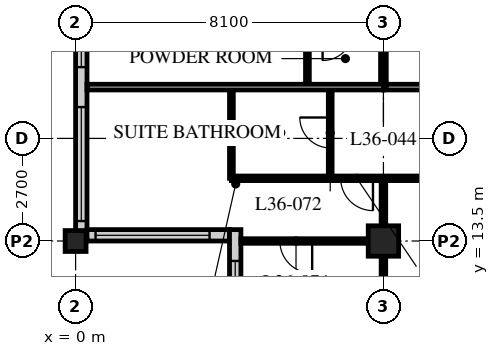
"""IFC4 building model, lengths in metres.
Left out: names, types, materials, properties, quantities, classifications, styles, units other than length and angle.
Written with IfcOpenShell. Run it as: python <this file> out.ifc"""

import sys

from ifc_helpers import new_model, si_unit, direction, frame, frame_2d, origin, origin_2d, place, context, subcontext, project, spatial, rectangle, hollow_rectangle, extrude, element, fill, save


model = new_model("IFC4")
c1 = context("Model", 3, precision=1e-05, world=origin(), true_north=direction((0.0, 1.0)))
c2 = subcontext(c1, "Body", "Model", "MODEL_VIEW")
j1 = project(units=[si_unit("LENGTHUNIT", "METRE"), si_unit("PLANEANGLEUNIT", "RADIAN")], contexts=[c1])
p1 = place(None, origin())
s1 = spatial("IfcSite", under=j1, at=p1, CompositionType="ELEMENT")
p2 = place(p1, origin())
s2 = spatial("IfcBuilding", under=s1, at=p2, CompositionType="ELEMENT")
p3 = place(p2, frame((0.0, 0.0, 140.8)))
s3 = spatial("IfcBuildingStorey", under=s2, at=p3, CompositionType="ELEMENT", Elevation=140.8)
p4 = place(p3, frame((0.0, 13.5, 0.0), z_axis=(0.0, 0.0, 1.0), x_axis=(1.0, 0.0, 0.0)))
e1 = element("IfcColumn", 1, at=p4, inside=s3, PredefinedType="COLUMN", context=c2, shape_type="SweptSolid", body=[
    extrude(hollow_rectangle(XDim=0.55, YDim=0.55, WallThickness=0.04, at=origin_2d()), origin(), (0.0, 0.0, 1.0), 3.4),
])
p5 = place(p3, frame((8.1, 13.5, 0.0), z_axis=(0.0, 0.0, 1.0), x_axis=(1.0, 0.0, 0.0)))
e2 = element("IfcColumn", 2, at=p5, inside=s3, PredefinedType="COLUMN", context=c2, shape_type="SweptSolid", body=[
    extrude(hollow_rectangle(XDim=0.8, YDim=0.8, WallThickness=0.08, at=origin_2d()), origin(), (0.0, 0.0, 1.0), 3.4),
])
p6 = place(p3, frame((0.15, 45.6, 0.0), z_axis=(0.0, 0.0, 1.0), x_axis=(0.0, -1.0, 0.0)))
e3 = element("IfcWall", 3, at=p6, inside=s3, PredefinedType="SOLIDWALL", context=c2, shape_type="SweptSolid", body=[
    extrude(rectangle(XDim=32.1, YDim=0.3, at=frame_2d((16.05, 0.0))), origin(), (0.0, 0.0, 1.0), 3.19),
])
p7 = place(p6, frame((0.225, 0.0, 0.9)))
e4 = element("IfcOpeningElement", 4, at=p7, cuts=e3, PredefinedType="OPENING", context=c2, shape_type="SweptSolid", body=[
    extrude(rectangle(XDim=3.0, YDim=2.0, at=frame_2d((1.5, 1.0))), frame((0.0, 0.16, 0.0), z_axis=(0.0, -1.0, 0.0), x_axis=(1.0, 0.0, 0.0)), (0.0, 0.0, 1.0), 0.32),
])
p8 = place(p6, frame((4.275, 0.0, 0.9)))
e5 = element("IfcOpeningElement", 5, at=p8, cuts=e3, PredefinedType="OPENING", context=c2, shape_type="SweptSolid", body=[
    extrude(rectangle(XDim=3.0, YDim=2.0, at=frame_2d((1.5, 1.0))), frame((0.0, 0.16, 0.0), z_axis=(0.0, -1.0, 0.0), x_axis=(1.0, 0.0, 0.0)), (0.0, 0.0, 1.0), 0.32),
])
p9 = place(p6, frame((8.325, 0.0, 0.9)))
e6 = element("IfcOpeningElement", 6, at=p9, cuts=e3, PredefinedType="OPENING", context=c2, shape_type="SweptSolid", body=[
    extrude(rectangle(XDim=3.0, YDim=2.0, at=frame_2d((1.5, 1.0))), frame((0.0, 0.16, 0.0), z_axis=(0.0, -1.0, 0.0), x_axis=(1.0, 0.0, 0.0)), (0.0, 0.0, 1.0), 0.32),
])
p10 = place(p6, frame((12.375, 0.0, 0.9)))
e7 = element("IfcOpeningElement", 7, at=p10, cuts=e3, PredefinedType="OPENING", context=c2, shape_type="SweptSolid", body=[
    extrude(rectangle(XDim=3.0, YDim=2.0, at=frame_2d((1.5, 1.0))), frame((0.0, 0.16, 0.0), z_axis=(0.0, -1.0, 0.0), x_axis=(1.0, 0.0, 0.0)), (0.0, 0.0, 1.0), 0.32),
])
p11 = place(p6, frame((16.425, 0.0, 0.9)))
e8 = element("IfcOpeningElement", 8, at=p11, cuts=e3, PredefinedType="OPENING", context=c2, shape_type="SweptSolid", body=[
    extrude(rectangle(XDim=3.0, YDim=2.0, at=frame_2d((1.5, 1.0))), frame((0.0, 0.16, 0.0), z_axis=(0.0, -1.0, 0.0), x_axis=(1.0, 0.0, 0.0)), (0.0, 0.0, 1.0), 0.32),
])
p12 = place(p6, frame((20.475, 0.0, 0.9)))
e9 = element("IfcOpeningElement", 9, at=p12, cuts=e3, PredefinedType="OPENING", context=c2, shape_type="SweptSolid", body=[
    extrude(rectangle(XDim=3.0, YDim=2.0, at=frame_2d((1.5, 1.0))), frame((0.0, 0.16, 0.0), z_axis=(0.0, -1.0, 0.0), x_axis=(1.0, 0.0, 0.0)), (0.0, 0.0, 1.0), 0.32),
])
p13 = place(p6, frame((24.525, 0.0, 0.9)))
e10 = element("IfcOpeningElement", 10, at=p13, cuts=e3, PredefinedType="OPENING", context=c2, shape_type="SweptSolid", body=[
    extrude(rectangle(XDim=3.0, YDim=2.0, at=frame_2d((1.5, 1.0))), frame((0.0, 0.16, 0.0), z_axis=(0.0, -1.0, 0.0), x_axis=(1.0, 0.0, 0.0)), (0.0, 0.0, 1.0), 0.32),
])
p14 = place(p6, frame((28.575, 0.0, 0.9)))
e11 = element("IfcOpeningElement", 11, at=p14, cuts=e3, PredefinedType="OPENING", context=c2, shape_type="SweptSolid", body=[
    extrude(rectangle(XDim=3.0, YDim=2.0, at=frame_2d((1.5, 1.0))), frame((0.0, 0.16, 0.0), z_axis=(0.0, -1.0, 0.0), x_axis=(1.0, 0.0, 0.0)), (0.0, 0.0, 1.0), 0.32),
])
p15 = place(p3, frame((0.3, 13.65, 0.0), z_axis=(0.0, 0.0, 1.0), x_axis=(1.0, 0.0, 0.0)))
e12 = element("IfcWall", 12, at=p15, inside=s3, PredefinedType="SOLIDWALL", context=c2, shape_type="SweptSolid", body=[
    extrude(rectangle(XDim=3.75, YDim=0.3, at=frame_2d((1.875, 0.0))), origin(), (0.0, 0.0, 1.0), 3.19),
])
p16 = place(p15, frame((0.225, 0.0, 0.9)))
e13 = element("IfcOpeningElement", 13, at=p16, cuts=e12, PredefinedType="OPENING", context=c2, shape_type="SweptSolid", body=[
    extrude(rectangle(XDim=3.0, YDim=1.5, at=frame_2d((1.5, 0.75))), frame((0.0, 0.16, 0.0), z_axis=(0.0, -1.0, 0.0), x_axis=(1.0, 0.0, 0.0)), (0.0, 0.0, 1.0), 0.32),
])
p17 = place(p3, frame((4.2, 13.8, 0.0), z_axis=(0.0, 0.0, 1.0), x_axis=(0.0, -1.0, 0.0)))
e14 = element("IfcWall", 14, at=p17, inside=s3, PredefinedType="SOLIDWALL", context=c2, shape_type="SweptSolid", body=[
    extrude(rectangle(XDim=4.35, YDim=0.3, at=frame_2d((2.175, 0.0))), origin(), (0.0, 0.0, 1.0), 3.19),
])
p18 = place(p17, frame((0.825, 0.0, 0.9)))
e15 = element("IfcOpeningElement", 15, at=p18, cuts=e14, PredefinedType="OPENING", context=c2, shape_type="SweptSolid", body=[
    extrude(rectangle(XDim=3.0, YDim=1.5, at=frame_2d((1.5, 0.75))), frame((0.0, 0.16, 0.0), z_axis=(0.0, -1.0, 0.0), x_axis=(1.0, 0.0, 0.0)), (0.0, 0.0, 1.0), 0.32),
])
p19 = place(p3, frame((8.1, 17.55, 0.0), z_axis=(0.0, 0.0, 1.0), x_axis=(1.0, 0.0, 0.0)))
e16 = element("IfcWall", 16, at=p19, inside=s3, PredefinedType="PARTITIONING", context=c2, shape_type="SweptSolid", body=[
    extrude(rectangle(XDim=36.45, YDim=0.15, at=frame_2d((18.225, 0.0))), origin(), (0.0, 0.0, 1.0), 3.19),
])
p20 = place(p19, frame((9.625, 0.0, 0.0)))
e17 = element("IfcOpeningElement", 17, at=p20, cuts=e16, PredefinedType="OPENING", context=c2, shape_type="SweptSolid", body=[
    extrude(rectangle(XDim=1.0, YDim=2.1, at=frame_2d((0.5, 1.05))), frame((0.0, 0.085, 0.0), z_axis=(0.0, -1.0, 0.0), x_axis=(1.0, 0.0, 0.0)), (0.0, 0.0, 1.0), 0.17),
])
p21 = place(p19, frame((18.1, 0.0, 0.0)))
e18 = element("IfcOpeningElement", 18, at=p21, cuts=e16, PredefinedType="OPENING", context=c2, shape_type="SweptSolid", body=[
    extrude(rectangle(XDim=1.0, YDim=2.1, at=frame_2d((0.5, 1.05))), frame((0.0, 0.085, 0.0), z_axis=(0.0, -1.0, 0.0), x_axis=(1.0, 0.0, 0.0)), (0.0, 0.0, 1.0), 0.17),
])
p22 = place(p19, frame((26.75, 0.0, 0.0)))
e19 = element("IfcOpeningElement", 19, at=p22, cuts=e16, PredefinedType="OPENING", context=c2, shape_type="SweptSolid", body=[
    extrude(rectangle(XDim=1.0, YDim=2.1, at=frame_2d((0.5, 1.05))), frame((0.0, 0.085, 0.0), z_axis=(0.0, -1.0, 0.0), x_axis=(1.0, 0.0, 0.0)), (0.0, 0.0, 1.0), 0.17),
])
p23 = place(p19, frame((30.8, 0.0, 0.0)))
e20 = element("IfcOpeningElement", 20, at=p23, cuts=e16, PredefinedType="OPENING", context=c2, shape_type="SweptSolid", body=[
    extrude(rectangle(XDim=1.0, YDim=2.1, at=frame_2d((0.5, 1.05))), frame((0.0, 0.085, 0.0), z_axis=(0.0, -1.0, 0.0), x_axis=(1.0, 0.0, 0.0)), (0.0, 0.0, 1.0), 0.17),
])
p24 = place(p19, frame((1.525, 0.0, 0.0)))
e21 = element("IfcOpeningElement", 21, at=p24, cuts=e16, PredefinedType="OPENING", context=c2, shape_type="SweptSolid", body=[
    extrude(rectangle(XDim=1.0, YDim=2.1, at=frame_2d((0.5, 1.05))), frame((0.0, 0.085, 0.0), z_axis=(0.0, -1.0, 0.0), x_axis=(1.0, 0.0, 0.0)), (0.0, 0.0, 1.0), 0.17),
])
p25 = place(p19, frame((33.925, 0.0, 0.0)))
e22 = element("IfcOpeningElement", 22, at=p25, cuts=e16, PredefinedType="OPENING", context=c2, shape_type="SweptSolid", body=[
    extrude(rectangle(XDim=1.0, YDim=2.1, at=frame_2d((0.5, 1.05))), frame((0.0, 0.085, 0.0), z_axis=(0.0, -1.0, 0.0), x_axis=(1.0, 0.0, 0.0)), (0.0, 0.0, 1.0), 0.17),
])
p26 = place(p3, frame((8.1, 17.55, 0.0), z_axis=(0.0, 0.0, 1.0), x_axis=(0.0, 1.0, 0.0)))
e23 = element("IfcWall", 23, at=p26, inside=s3, PredefinedType="PARTITIONING", context=c2, shape_type="SweptSolid", body=[
    extrude(rectangle(XDim=28.35, YDim=0.15, at=frame_2d((14.175, 0.0))), origin(), (0.0, 0.0, 1.0), 2.578),
])
p27 = place(p26, frame((1.9, 0.0, 0.0)))
e24 = element("IfcOpeningElement", 24, at=p27, cuts=e23, PredefinedType="OPENING", context=c2, shape_type="SweptSolid", body=[
    extrude(rectangle(XDim=1.0, YDim=2.1, at=frame_2d((0.5, 1.05))), frame((0.0, 0.085, 0.0), z_axis=(0.0, -1.0, 0.0), x_axis=(1.0, 0.0, 0.0)), (0.0, 0.0, 1.0), 0.17),
])
p28 = place(p26, frame((10.0, 0.0, 0.0)))
e25 = element("IfcOpeningElement", 25, at=p28, cuts=e23, PredefinedType="OPENING", context=c2, shape_type="SweptSolid", body=[
    extrude(rectangle(XDim=1.0, YDim=2.1, at=frame_2d((0.5, 1.05))), frame((0.0, 0.085, 0.0), z_axis=(0.0, -1.0, 0.0), x_axis=(1.0, 0.0, 0.0)), (0.0, 0.0, 1.0), 0.17),
])
p29 = place(p26, frame((18.1, 0.0, 0.0)))
e26 = element("IfcOpeningElement", 26, at=p29, cuts=e23, PredefinedType="OPENING", context=c2, shape_type="SweptSolid", body=[
    extrude(rectangle(XDim=1.0, YDim=2.1, at=frame_2d((0.5, 1.05))), frame((0.0, 0.085, 0.0), z_axis=(0.0, -1.0, 0.0), x_axis=(1.0, 0.0, 0.0)), (0.0, 0.0, 1.0), 0.17),
])
p30 = place(p26, frame((24.9, 0.0, 0.0)))
e27 = element("IfcOpeningElement", 27, at=p30, cuts=e23, PredefinedType="OPENING", context=c2, shape_type="SweptSolid", body=[
    extrude(rectangle(XDim=1.0, YDim=2.1, at=frame_2d((0.5, 1.05))), frame((0.0, 0.085, 0.0), z_axis=(0.0, -1.0, 0.0), x_axis=(1.0, 0.0, 0.0)), (0.0, 0.0, 1.0), 0.17),
])
p31 = place(p3, frame((6.1, 17.55, 0.0), z_axis=(0.0, 0.0, 1.0), x_axis=(0.0, 1.0, 0.0)))
e28 = element("IfcWall", 28, at=p31, inside=s3, PredefinedType="PARTITIONING", context=c2, shape_type="SweptSolid", body=[
    extrude(rectangle(XDim=1.5, YDim=0.1, at=frame_2d((0.75, 0.0))), origin(), (0.0, 0.0, 1.0), 3.19),
])
p32 = place(p3, frame((6.7, 17.55, 0.0), z_axis=(0.0, 0.0, 1.0), x_axis=(0.0, -1.0, 0.0)))
e29 = element("IfcWall", 29, at=p32, inside=s3, PredefinedType="PARTITIONING", context=c2, shape_type="SweptSolid", body=[
    extrude(rectangle(XDim=2.4, YDim=0.1, at=frame_2d((1.2, 0.0))), origin(), (0.0, 0.0, 1.0), 3.19),
])
p33 = place(p32, frame((0.8, 0.0, 0.0)))
e30 = element("IfcOpeningElement", 30, at=p33, cuts=e29, PredefinedType="OPENING", context=c2, shape_type="SweptSolid", body=[
    extrude(rectangle(XDim=0.8, YDim=2.1, at=frame_2d((0.4, 1.05))), frame((0.0, 0.06, 0.0), z_axis=(0.0, -1.0, 0.0), x_axis=(1.0, 0.0, 0.0)), (0.0, 0.0, 1.0), 0.12),
])
p34 = place(p3, frame((4.1, 17.55, 0.0), z_axis=(0.0, 0.0, 1.0), x_axis=(0.0, -1.0, 0.0)))
e31 = element("IfcWall", 31, at=p34, inside=s3, PredefinedType="PARTITIONING", context=c2, shape_type="SweptSolid", body=[
    extrude(rectangle(XDim=2.4, YDim=0.1, at=frame_2d((1.2, 0.0))), origin(), (0.0, 0.0, 1.0), 3.19),
])
p35 = place(p3, frame((4.1, 15.15, 0.0), z_axis=(0.0, 0.0, 1.0), x_axis=(1.0, 0.0, 0.0)))
e32 = element("IfcWall", 32, at=p35, inside=s3, PredefinedType="PARTITIONING", context=c2, shape_type="SweptSolid", body=[
    extrude(rectangle(XDim=8.05, YDim=0.12, at=frame_2d((4.025, 0.0))), origin(), (0.0, 0.0, 1.0), 3.19),
])
p36 = place(p35, frame((6.725, 0.0, 0.0)))
e33 = element("IfcOpeningElement", 33, at=p36, cuts=e32, PredefinedType="OPENING", context=c2, shape_type="SweptSolid", body=[
    extrude(rectangle(XDim=0.85, YDim=2.1, at=frame_2d((0.425, 1.05))), frame((0.0, 0.07, 0.0), z_axis=(0.0, -1.0, 0.0), x_axis=(1.0, 0.0, 0.0)), (0.0, 0.0, 1.0), 0.14),
])
p37 = place(p35, frame((2.875, 0.0, 0.0)))
e34 = element("IfcOpeningElement", 34, at=p37, cuts=e32, PredefinedType="OPENING", context=c2, shape_type="SweptSolid", body=[
    extrude(rectangle(XDim=0.85, YDim=2.1, at=frame_2d((0.425, 1.05))), frame((0.0, 0.07, 0.0), z_axis=(0.0, -1.0, 0.0), x_axis=(1.0, 0.0, 0.0)), (0.0, 0.0, 1.0), 0.14),
])
p38 = place(p3, frame((8.1, 15.15, 0.0), z_axis=(0.0, 0.0, 1.0), x_axis=(0.0, -1.0, 0.0)))
e35 = element("IfcWall", 35, at=p38, inside=s3, PredefinedType="PARTITIONING", context=c2, shape_type="SweptSolid", body=[
    extrude(rectangle(XDim=5.4, YDim=0.12, at=frame_2d((2.7, 0.0))), origin(), (0.0, 0.0, 1.0), 2.578),
])
p39 = place(p3, frame((8.1, 13.5, 0.0), z_axis=(0.0, 0.0, 1.0), x_axis=(-1.0, 0.0, 0.0)))
e36 = element("IfcWall", 36, at=p39, inside=s3, PredefinedType="PARTITIONING", context=c2, shape_type="SweptSolid", body=[
    extrude(rectangle(XDim=3.75, YDim=0.12, at=frame_2d((1.875, 0.0))), origin(), (0.0, 0.0, 1.0), 2.578),
])
p40 = place(p39, frame((1.875, 0.0, 0.0)))
e37 = element("IfcOpeningElement", 37, at=p40, cuts=e36, PredefinedType="OPENING", context=c2, shape_type="SweptSolid", body=[
    extrude(rectangle(XDim=0.85, YDim=2.1, at=frame_2d((0.425, 1.05))), frame((0.0, 0.07, 0.0), z_axis=(0.0, -1.0, 0.0), x_axis=(1.0, 0.0, 0.0)), (0.0, 0.0, 1.0), 0.14),
])
p41 = place(p3, frame((0.3, 17.55, 0.0), z_axis=(0.0, 0.0, 1.0), x_axis=(1.0, 0.0, 0.0)))
e38 = element("IfcWall", 38, at=p41, inside=s3, PredefinedType="PARTITIONING", context=c2, shape_type="SweptSolid", body=[
    extrude(rectangle(XDim=7.8, YDim=0.15, at=frame_2d((3.9, 0.0))), origin(), (0.0, 0.0, 1.0), 3.19),
])
p42 = place(p13, origin())
e39 = element("IfcWindow", 39, at=p42, inside=s3, PartitioningType="SINGLE_PANEL", PredefinedType="WINDOW", context=c2, shape_type="SweptSolid", body=[
    extrude(rectangle(XDim=3.0, YDim=2.0, at=frame_2d((1.5, 1.0))), frame((0.0, 0.03, 0.0), z_axis=(0.0, -1.0, 0.0), x_axis=(1.0, 0.0, 0.0)), (0.0, 0.0, 1.0), 0.06),
])
fill(e10, e39)
p43 = place(p14, origin())
e40 = element("IfcWindow", 40, at=p43, inside=s3, PartitioningType="SINGLE_PANEL", PredefinedType="WINDOW", context=c2, shape_type="SweptSolid", body=[
    extrude(rectangle(XDim=3.0, YDim=2.0, at=frame_2d((1.5, 1.0))), frame((0.0, 0.03, 0.0), z_axis=(0.0, -1.0, 0.0), x_axis=(1.0, 0.0, 0.0)), (0.0, 0.0, 1.0), 0.06),
])
fill(e11, e40)
p44 = place(p16, origin())
e41 = element("IfcWindow", 41, at=p44, inside=s3, PartitioningType="SINGLE_PANEL", PredefinedType="WINDOW", context=c2, shape_type="SweptSolid", body=[
    extrude(rectangle(XDim=3.0, YDim=1.5, at=frame_2d((1.5, 0.75))), frame((0.0, 0.03, 0.0), z_axis=(0.0, -1.0, 0.0), x_axis=(1.0, 0.0, 0.0)), (0.0, 0.0, 1.0), 0.06),
])
fill(e13, e41)
p45 = place(p18, origin())
e42 = element("IfcWindow", 42, at=p45, inside=s3, PartitioningType="SINGLE_PANEL", PredefinedType="WINDOW", context=c2, shape_type="SweptSolid", body=[
    extrude(rectangle(XDim=3.0, YDim=1.5, at=frame_2d((1.5, 0.75))), frame((0.0, 0.03, 0.0), z_axis=(0.0, -1.0, 0.0), x_axis=(1.0, 0.0, 0.0)), (0.0, 0.0, 1.0), 0.06),
])
fill(e15, e42)
p46 = place(p33, origin())
e43 = element("IfcDoor", 43, at=p46, inside=s3, OperationType="SINGLE_SWING_RIGHT", PredefinedType="DOOR", context=c2, shape_type="SweptSolid", body=[
    extrude(rectangle(XDim=0.8, YDim=2.1, at=frame_2d((0.4, 1.05))), frame((0.0, 0.025, 0.0), z_axis=(0.0, -1.0, 0.0), x_axis=(1.0, 0.0, 0.0)), (0.0, 0.0, 1.0), 0.05),
])
fill(e30, e43)
p47 = place(p37, origin())
e44 = element("IfcDoor", 44, at=p47, inside=s3, OperationType="SINGLE_SWING_LEFT", PredefinedType="DOOR", context=c2, shape_type="SweptSolid", body=[
    extrude(rectangle(XDim=0.85, YDim=2.1, at=frame_2d((0.425, 1.05))), frame((0.0, 0.025, 0.0), z_axis=(0.0, -1.0, 0.0), x_axis=(1.0, 0.0, 0.0)), (0.0, 0.0, 1.0), 0.05),
])
fill(e34, e44)
p48 = place(p40, origin())
e45 = element("IfcDoor", 45, at=p48, inside=s3, OperationType="SINGLE_SWING_LEFT", PredefinedType="DOOR", context=c2, shape_type="SweptSolid", body=[
    extrude(rectangle(XDim=0.85, YDim=2.1, at=frame_2d((0.425, 1.05))), frame((0.0, 0.025, 0.0), z_axis=(0.0, -1.0, 0.0), x_axis=(1.0, 0.0, 0.0)), (0.0, 0.0, 1.0), 0.05),
])
fill(e37, e45)
save(model, sys.argv[1])
